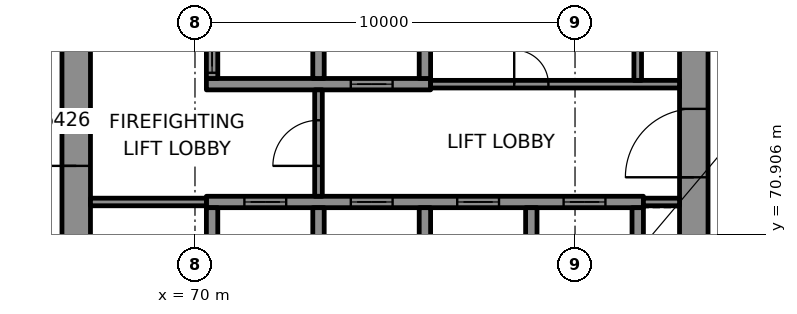
"""IFC4 building model, lengths in metres.
Left out: names, types, materials, properties, quantities, classifications, styles, units other than length and angle.
Written with IfcOpenShell. Run it as: python <this file> out.ifc"""

import sys

from ifc_helpers import new_model, si_unit, direction, frame, frame_2d, origin, place, context, subcontext, project, spatial, rectangle, extrude, element, fill, save


model = new_model("IFC4")
c1 = context("Model", 3, precision=1e-05, world=origin(), true_north=direction((0.0, 1.0)))
c2 = subcontext(c1, "Body", "Model", "MODEL_VIEW")
j1 = project(units=[si_unit("LENGTHUNIT", "METRE"), si_unit("PLANEANGLEUNIT", "RADIAN")], contexts=[c1])
p1 = place(None, origin())
s1 = spatial("IfcSite", under=j1, at=p1, CompositionType="ELEMENT")
p2 = place(p1, origin())
s2 = spatial("IfcBuilding", under=s1, at=p2, CompositionType="ELEMENT")
p3 = place(p2, frame((0.0, 0.0, 270.6)))
s3 = spatial("IfcBuildingStorey", under=s2, at=p3, CompositionType="ELEMENT", Elevation=270.6)
p4 = place(p3, frame((66.875, 69.0, 0.0), z_axis=(0.0, 0.0, 1.0), x_axis=(0.0, 1.0, 0.0)))
e1 = element("IfcWall", 1, at=p4, inside=s3, PredefinedType="SHEAR", context=c2, shape_type="SweptSolid", body=[
    extrude(rectangle(XDim=12.0, YDim=0.75, at=frame_2d((6.0, 0.0))), origin(), (0.0, 0.0, 1.0), 3.3),
])
p5 = place(p4, frame((3.7, 0.0, 0.0)))
e2 = element("IfcOpeningElement", 2, at=p5, cuts=e1, PredefinedType="OPENING", context=c2, shape_type="SweptSolid", body=[
    extrude(rectangle(XDim=1.2, YDim=2.1, at=frame_2d((0.6, 1.05))), frame((0.0, 0.385, 0.0), z_axis=(0.0, -1.0, 0.0), x_axis=(1.0, 0.0, 0.0)), (0.0, 0.0, 1.0), 0.77),
])
p6 = place(p3, frame((83.125, 69.0, 0.0), z_axis=(0.0, 0.0, 1.0), x_axis=(0.0, 1.0, 0.0)))
e3 = element("IfcWall", 3, at=p6, inside=s3, PredefinedType="SHEAR", context=c2, shape_type="SweptSolid", body=[
    extrude(rectangle(XDim=12.0, YDim=0.75, at=frame_2d((6.0, 0.0))), origin(), (0.0, 0.0, 1.0), 3.3),
])
p7 = place(p6, frame((3.4, 0.0, 0.0)))
e4 = element("IfcOpeningElement", 4, at=p7, cuts=e3, PredefinedType="OPENING", context=c2, shape_type="SweptSolid", body=[
    extrude(rectangle(XDim=1.8, YDim=2.1, at=frame_2d((0.9, 1.05))), frame((0.0, 0.385, 0.0), z_axis=(0.0, -1.0, 0.0), x_axis=(1.0, 0.0, 0.0)), (0.0, 0.0, 1.0), 0.77),
])
p8 = place(p3, frame((70.3, 71.75, 0.0), z_axis=(0.0, 0.0, 1.0), x_axis=(1.0, 0.0, 0.0)))
e5 = element("IfcWall", 5, at=p8, inside=s3, PredefinedType="SHEAR", context=c2, shape_type="SweptSolid", body=[
    extrude(rectangle(XDim=11.5, YDim=0.3, at=frame_2d((5.75, 0.0))), origin(), (0.0, 0.0, 1.0), 3.3),
])
p9 = place(p8, frame((1.0, 0.0, 0.0)))
e6 = element("IfcOpeningElement", 6, at=p9, cuts=e5, PredefinedType="OPENING", context=c2, shape_type="SweptSolid", body=[
    extrude(rectangle(XDim=1.1, YDim=2.1, at=frame_2d((0.55, 1.05))), frame((0.0, 0.16, 0.0), z_axis=(0.0, -1.0, 0.0), x_axis=(1.0, 0.0, 0.0)), (0.0, 0.0, 1.0), 0.32),
])
p10 = place(p8, frame((3.8, 0.0, 0.0)))
e7 = element("IfcOpeningElement", 7, at=p10, cuts=e5, PredefinedType="OPENING", context=c2, shape_type="SweptSolid", body=[
    extrude(rectangle(XDim=1.1, YDim=2.1, at=frame_2d((0.55, 1.05))), frame((0.0, 0.16, 0.0), z_axis=(0.0, -1.0, 0.0), x_axis=(1.0, 0.0, 0.0)), (0.0, 0.0, 1.0), 0.32),
])
p11 = place(p8, frame((6.6, 0.0, 0.0)))
e8 = element("IfcOpeningElement", 8, at=p11, cuts=e5, PredefinedType="OPENING", context=c2, shape_type="SweptSolid", body=[
    extrude(rectangle(XDim=1.1, YDim=2.1, at=frame_2d((0.55, 1.05))), frame((0.0, 0.16, 0.0), z_axis=(0.0, -1.0, 0.0), x_axis=(1.0, 0.0, 0.0)), (0.0, 0.0, 1.0), 0.32),
])
p12 = place(p8, frame((9.4, 0.0, 0.0)))
e9 = element("IfcOpeningElement", 9, at=p12, cuts=e5, PredefinedType="OPENING", context=c2, shape_type="SweptSolid", body=[
    extrude(rectangle(XDim=1.1, YDim=2.1, at=frame_2d((0.55, 1.05))), frame((0.0, 0.16, 0.0), z_axis=(0.0, -1.0, 0.0), x_axis=(1.0, 0.0, 0.0)), (0.0, 0.0, 1.0), 0.32),
])
p13 = place(p3, frame((70.3, 74.85, 0.0), z_axis=(0.0, 0.0, 1.0), x_axis=(1.0, 0.0, 0.0)))
e10 = element("IfcWall", 10, at=p13, inside=s3, PredefinedType="SHEAR", context=c2, shape_type="SweptSolid", body=[
    extrude(rectangle(XDim=5.9, YDim=0.3, at=frame_2d((2.95, 0.0))), origin(), (0.0, 0.0, 1.0), 3.3),
])
p14 = place(p13, frame((3.8, 0.0, 0.0)))
e11 = element("IfcOpeningElement", 11, at=p14, cuts=e10, PredefinedType="OPENING", context=c2, shape_type="SweptSolid", body=[
    extrude(rectangle(XDim=1.1, YDim=2.1, at=frame_2d((0.55, 1.05))), frame((0.0, 0.16, 0.0), z_axis=(0.0, -1.0, 0.0), x_axis=(1.0, 0.0, 0.0)), (0.0, 0.0, 1.0), 0.32),
])
p15 = place(p3, frame((70.45, 69.0, 0.0), z_axis=(0.0, 0.0, 1.0), x_axis=(0.0, 1.0, 0.0)))
e12 = element("IfcWall", 12, at=p15, inside=s3, PredefinedType="SHEAR", context=c2, shape_type="SweptSolid", body=[
    extrude(rectangle(XDim=2.6, YDim=0.3, at=frame_2d((1.3, 0.0))), origin(), (0.0, 0.0, 1.0), 3.3),
])
p16 = place(p3, frame((70.45, 75.0, 0.0), z_axis=(0.0, 0.0, 1.0), x_axis=(0.0, 1.0, 0.0)))
e13 = element("IfcWall", 13, at=p16, inside=s3, PredefinedType="SHEAR", context=c2, shape_type="SweptSolid", body=[
    extrude(rectangle(XDim=2.6, YDim=0.3, at=frame_2d((1.3, 0.0))), origin(), (0.0, 0.0, 1.0), 3.3),
])
p17 = place(p16, frame((0.15, 0.0, 0.0)))
e14 = element("IfcOpeningElement", 14, at=p17, cuts=e13, PredefinedType="OPENING", context=c2, shape_type="SweptSolid", body=[
    extrude(rectangle(XDim=1.1, YDim=2.1, at=frame_2d((0.55, 1.05))), frame((0.0, 0.16, 0.0), z_axis=(0.0, -1.0, 0.0), x_axis=(1.0, 0.0, 0.0)), (0.0, 0.0, 1.0), 0.32),
])
for number, where, z_axis, x_axis in (
    (15, (73.25, 69.0, 0.0), (0.0, 0.0, 1.0), (0.0, 1.0, 0.0)),
    (16, (73.25, 75.0, 0.0), (0.0, 0.0, 1.0), (0.0, 1.0, 0.0)),
    (17, (76.05, 69.0, 0.0), (0.0, 0.0, 1.0), (0.0, 1.0, 0.0)),
    (18, (76.05, 75.0, 0.0), (0.0, 0.0, 1.0), (0.0, 1.0, 0.0)),
    (19, (78.85, 69.0, 0.0), (0.0, 0.0, 1.0), (0.0, 1.0, 0.0)),
    (20, (81.65, 69.0, 0.0), (0.0, 0.0, 1.0), (0.0, 1.0, 0.0)),
):
    element("IfcWall", number, at=place(p3, frame(where, z_axis=z_axis, x_axis=x_axis)), inside=s3, PredefinedType="SHEAR", context=c2, shape_type="SweptSolid", body=[
        extrude(rectangle(XDim=2.6, YDim=0.3, at=frame_2d((1.3, 0.0))), origin(), (0.0, 0.0, 1.0), 3.3),
    ])
p18 = place(p3, frame((67.25, 71.75, 0.0), z_axis=(0.0, 0.0, 1.0), x_axis=(1.0, 0.0, 0.0)))
e21 = element("IfcWall", 21, at=p18, inside=s3, PredefinedType="PARTITIONING", context=c2, shape_type="SweptSolid", body=[
    extrude(rectangle(XDim=3.05, YDim=0.2, at=frame_2d((1.525, 0.0))), origin(), (0.0, 0.0, 1.0), 3.3),
])
p19 = place(p3, frame((81.8, 71.75, 0.0), z_axis=(0.0, 0.0, 1.0), x_axis=(1.0, 0.0, 0.0)))
e22 = element("IfcWall", 22, at=p19, inside=s3, PredefinedType="PARTITIONING", context=c2, shape_type="SweptSolid", body=[
    extrude(rectangle(XDim=0.95, YDim=0.2, at=frame_2d((0.475, 0.0))), origin(), (0.0, 0.0, 1.0), 3.3),
])
p20 = place(p3, frame((76.2, 74.85, 0.0), z_axis=(0.0, 0.0, 1.0), x_axis=(1.0, 0.0, 0.0)))
e23 = element("IfcWall", 23, at=p20, inside=s3, PredefinedType="PARTITIONING", context=c2, shape_type="SweptSolid", body=[
    extrude(rectangle(XDim=6.55, YDim=0.2, at=frame_2d((3.275, 0.0))), origin(), (0.0, 0.0, 1.0), 3.3),
])
p21 = place(p20, frame((2.2, 0.0, 0.0)))
e24 = element("IfcOpeningElement", 24, at=p21, cuts=e23, PredefinedType="OPENING", context=c2, shape_type="SweptSolid", body=[
    extrude(rectangle(XDim=0.9, YDim=2.1, at=frame_2d((0.45, 1.05))), frame((0.0, 0.11, 0.0), z_axis=(0.0, -1.0, 0.0), x_axis=(1.0, 0.0, 0.0)), (0.0, 0.0, 1.0), 0.22),
])
p22 = place(p3, frame((73.25, 71.9, 0.0), z_axis=(0.0, 0.0, 1.0), x_axis=(0.0, 1.0, 0.0)))
e25 = element("IfcWall", 25, at=p22, inside=s3, PredefinedType="PARTITIONING", context=c2, shape_type="SweptSolid", body=[
    extrude(rectangle(XDim=2.8, YDim=0.2, at=frame_2d((1.4, 0.0))), origin(), (0.0, 0.0, 1.0), 3.3),
])
p23 = place(p22, frame((0.8, 0.0, 0.0)))
e26 = element("IfcOpeningElement", 26, at=p23, cuts=e25, PredefinedType="OPENING", context=c2, shape_type="SweptSolid", body=[
    extrude(rectangle(XDim=1.2, YDim=2.1, at=frame_2d((0.6, 1.05))), frame((0.0, 0.11, 0.0), z_axis=(0.0, -1.0, 0.0), x_axis=(1.0, 0.0, 0.0)), (0.0, 0.0, 1.0), 0.22),
])
p24 = place(p3, frame((81.65, 74.95, 0.0), z_axis=(0.0, 0.0, 1.0), x_axis=(0.0, 1.0, 0.0)))
e27 = element("IfcWall", 27, at=p24, inside=s3, PredefinedType="PARTITIONING", context=c2, shape_type="SweptSolid", body=[
    extrude(rectangle(XDim=2.65, YDim=0.2, at=frame_2d((1.325, 0.0))), origin(), (0.0, 0.0, 1.0), 3.3),
])
p25 = place(p9, origin())
e28 = element("IfcDoor", 28, at=p25, inside=s3, OperationType="DOUBLE_DOOR_SLIDING", PredefinedType="DOOR", context=c2, shape_type="SweptSolid", body=[
    extrude(rectangle(XDim=1.1, YDim=2.1, at=frame_2d((0.55, 1.05))), frame((0.0, 0.025, 0.0), z_axis=(0.0, -1.0, 0.0), x_axis=(1.0, 0.0, 0.0)), (0.0, 0.0, 1.0), 0.05),
])
fill(e6, e28)
p26 = place(p10, origin())
e29 = element("IfcDoor", 29, at=p26, inside=s3, OperationType="DOUBLE_DOOR_SLIDING", PredefinedType="DOOR", context=c2, shape_type="SweptSolid", body=[
    extrude(rectangle(XDim=1.1, YDim=2.1, at=frame_2d((0.55, 1.05))), frame((0.0, 0.025, 0.0), z_axis=(0.0, -1.0, 0.0), x_axis=(1.0, 0.0, 0.0)), (0.0, 0.0, 1.0), 0.05),
])
fill(e7, e29)
p27 = place(p11, origin())
e30 = element("IfcDoor", 30, at=p27, inside=s3, OperationType="DOUBLE_DOOR_SLIDING", PredefinedType="DOOR", context=c2, shape_type="SweptSolid", body=[
    extrude(rectangle(XDim=1.1, YDim=2.1, at=frame_2d((0.55, 1.05))), frame((0.0, 0.025, 0.0), z_axis=(0.0, -1.0, 0.0), x_axis=(1.0, 0.0, 0.0)), (0.0, 0.0, 1.0), 0.05),
])
fill(e8, e30)
p28 = place(p12, origin())
e31 = element("IfcDoor", 31, at=p28, inside=s3, OperationType="DOUBLE_DOOR_SLIDING", PredefinedType="DOOR", context=c2, shape_type="SweptSolid", body=[
    extrude(rectangle(XDim=1.1, YDim=2.1, at=frame_2d((0.55, 1.05))), frame((0.0, 0.025, 0.0), z_axis=(0.0, -1.0, 0.0), x_axis=(1.0, 0.0, 0.0)), (0.0, 0.0, 1.0), 0.05),
])
fill(e9, e31)
p29 = place(p17, origin())
e32 = element("IfcDoor", 32, at=p29, inside=s3, OperationType="DOUBLE_DOOR_SLIDING", PredefinedType="DOOR", context=c2, shape_type="SweptSolid", body=[
    extrude(rectangle(XDim=1.1, YDim=2.1, at=frame_2d((0.55, 1.05))), frame((0.0, 0.025, 0.0), z_axis=(0.0, -1.0, 0.0), x_axis=(1.0, 0.0, 0.0)), (0.0, 0.0, 1.0), 0.05),
])
fill(e14, e32)
p30 = place(p14, origin())
e33 = element("IfcDoor", 33, at=p30, inside=s3, OperationType="DOUBLE_DOOR_SLIDING", PredefinedType="DOOR", context=c2, shape_type="SweptSolid", body=[
    extrude(rectangle(XDim=1.1, YDim=2.1, at=frame_2d((0.55, 1.05))), frame((0.0, 0.025, 0.0), z_axis=(0.0, -1.0, 0.0), x_axis=(1.0, 0.0, 0.0)), (0.0, 0.0, 1.0), 0.05),
])
fill(e11, e33)
p31 = place(p23, origin())
e34 = element("IfcDoor", 34, at=p31, inside=s3, OperationType="SINGLE_SWING_LEFT", PredefinedType="DOOR", context=c2, shape_type="SweptSolid", body=[
    extrude(rectangle(XDim=1.2, YDim=2.1, at=frame_2d((0.6, 1.05))), frame((0.0, 0.025, 0.0), z_axis=(0.0, -1.0, 0.0), x_axis=(1.0, 0.0, 0.0)), (0.0, 0.0, 1.0), 0.05),
])
fill(e26, e34)
p32 = place(p5, origin())
e35 = element("IfcDoor", 35, at=p32, inside=s3, OperationType="SINGLE_SWING_RIGHT", PredefinedType="DOOR", context=c2, shape_type="SweptSolid", body=[
    extrude(rectangle(XDim=1.2, YDim=2.1, at=frame_2d((0.6, 1.05))), frame((0.0, 0.095, 0.0), z_axis=(0.0, -1.0, 0.0), x_axis=(1.0, 0.0, 0.0)), (0.0, 0.0, 1.0), 0.19),
])
fill(e2, e35)
p33 = place(p7, origin())
e36 = element("IfcDoor", 36, at=p33, inside=s3, OperationType="SINGLE_SWING_LEFT", PredefinedType="DOOR", context=c2, shape_type="SweptSolid", body=[
    extrude(rectangle(XDim=1.8, YDim=2.1, at=frame_2d((0.9, 1.05))), frame((0.0, 0.095, 0.0), z_axis=(0.0, -1.0, 0.0), x_axis=(1.0, 0.0, 0.0)), (0.0, 0.0, 1.0), 0.19),
])
fill(e4, e36)
p34 = place(p21, origin())
e37 = element("IfcDoor", 37, at=p34, inside=s3, OperationType="SINGLE_SWING_LEFT", PredefinedType="DOOR", context=c2, shape_type="SweptSolid", body=[
    extrude(rectangle(XDim=0.9, YDim=2.1, at=frame_2d((0.45, 1.05))), frame((0.0, 0.025, 0.0), z_axis=(0.0, -1.0, 0.0), x_axis=(1.0, 0.0, 0.0)), (0.0, 0.0, 1.0), 0.05),
])
fill(e24, e37)
save(model, sys.argv[1])
